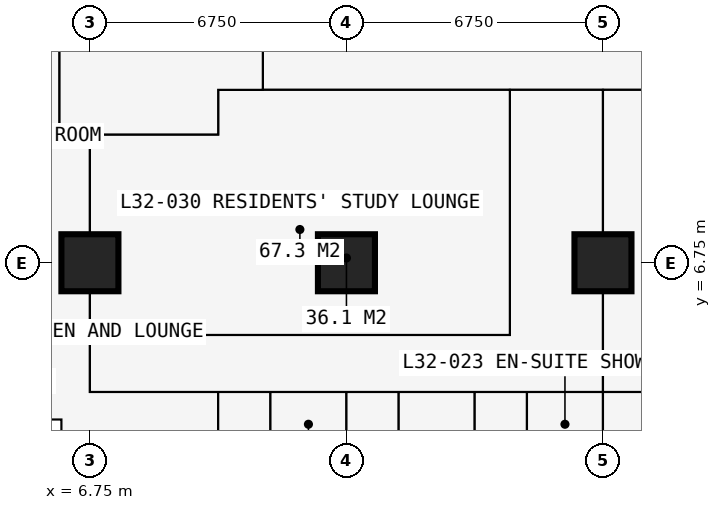
"""IFC4 building model, lengths in metres.
Left out: names, types, materials, properties, quantities, classifications, styles, units other than length and angle.
Written with IfcOpenShell. Run it as: python <this file> out.ifc"""

import sys

from ifc_helpers import new_model, si_unit, direction, frame, frame_2d, origin, origin_2d, place, context, subcontext, project, spatial, rectangle, extrude, element, fill, save


model = new_model("IFC4")
c1 = context("Model", 3, precision=1e-05, world=origin(), true_north=direction((0.0, 1.0)))
c2 = subcontext(c1, "Body", "Model", "MODEL_VIEW")
j1 = project(units=[si_unit("LENGTHUNIT", "METRE"), si_unit("PLANEANGLEUNIT", "RADIAN")], contexts=[c1])
p1 = place(None, origin())
s1 = spatial("IfcSite", under=j1, at=p1, CompositionType="ELEMENT")
p2 = place(p1, origin())
s2 = spatial("IfcBuilding", under=s1, at=p2, CompositionType="ELEMENT")
p3 = place(p2, frame((0.0, 0.0, 119.7)))
s3 = spatial("IfcBuildingStorey", under=s2, at=p3, CompositionType="ELEMENT", Elevation=119.7)
for number, where, z_axis, x_axis in (
    (1, (6.75, 6.75, 0.0), (0.0, 0.0, 1.0), (1.0, 0.0, 0.0)),
    (2, (13.5, 6.75, 0.0), (0.0, 0.0, 1.0), (1.0, 0.0, 0.0)),
    (3, (20.25, 6.75, 0.0), (0.0, 0.0, 1.0), (1.0, 0.0, 0.0)),
):
    element("IfcColumn", number, at=place(p3, frame(where, z_axis=z_axis, x_axis=x_axis)), inside=s3, PredefinedType="COLUMN", context=c2, shape_type="SweptSolid", body=[
        extrude(rectangle(XDim=1.5, YDim=1.5, at=origin_2d()), origin(), (0.0, 0.0, 1.0), 3.6),
    ])
p4 = place(p3, frame((2.625, 2.625, 0.0), z_axis=(0.0, 0.0, 1.0), x_axis=(1.0, 0.0, 0.0)))
e4 = element("IfcWall", 4, at=p4, inside=s3, PredefinedType="SOLIDWALL", context=c2, shape_type="SweptSolid", body=[
    extrude(rectangle(XDim=3.375, YDim=0.3, at=frame_2d((1.688, 0.0))), origin(), (0.0, 0.0, 1.0), 3.375),
])
p5 = place(p4, frame((0.788, 0.0, 0.6)))
e5 = element("IfcOpeningElement", 5, at=p5, cuts=e4, PredefinedType="OPENING", context=c2, shape_type="SweptSolid", body=[
    extrude(rectangle(XDim=1.8, YDim=2.1, at=frame_2d((0.9, 1.05))), frame((0.0, 0.16, 0.0), z_axis=(0.0, -1.0, 0.0), x_axis=(1.0, 0.0, 0.0)), (0.0, 0.0, 1.0), 0.32),
])
p6 = place(p3, frame((6.0, 2.625, 0.0), z_axis=(0.0, 0.0, 1.0), x_axis=(0.0, -1.0, 0.0)))
e6 = element("IfcWall", 6, at=p6, inside=s3, PredefinedType="SOLIDWALL", context=c2, shape_type="SweptSolid", body=[
    extrude(rectangle(XDim=3.375, YDim=0.3, at=frame_2d((1.688, 0.0))), origin(), (0.0, 0.0, 1.0), 3.375),
])
p7 = place(p6, frame((0.268, 0.0, 0.9)))
e7 = element("IfcOpeningElement", 7, at=p7, cuts=e6, PredefinedType="OPENING", context=c2, shape_type="SweptSolid", body=[
    extrude(rectangle(XDim=1.5, YDim=1.8, at=frame_2d((0.75, 0.9))), frame((0.0, 0.16, 0.0), z_axis=(0.0, -1.0, 0.0), x_axis=(1.0, 0.0, 0.0)), (0.0, 0.0, 1.0), 0.32),
])
p8 = place(p3, frame((-0.734, 10.125, 0.0), z_axis=(0.0, 0.0, 1.0), x_axis=(1.0, 0.0, 0.0)))
e8 = element("IfcWall", 8, at=p8, inside=s3, PredefinedType="PARTITIONING", context=c2, shape_type="SweptSolid", body=[
    extrude(rectangle(XDim=10.859, YDim=0.15, at=frame_2d((5.429, 0.0))), origin(), (0.0, 0.0, 1.0), 3.375),
])
p9 = place(p3, frame((5.95, 10.125, 0.0), z_axis=(0.0, 0.0, 1.0), x_axis=(0.0, 1.0, 0.0)))
e9 = element("IfcWall", 9, at=p9, inside=s3, PredefinedType="PARTITIONING", context=c2, shape_type="SweptSolid", body=[
    extrude(rectangle(XDim=2.65, YDim=0.15, at=frame_2d((1.325, 0.0))), origin(), (0.0, 0.0, 1.0), 3.375),
])
p10 = place(p3, frame((6.75, 3.35, 0.0), z_axis=(0.0, 0.0, 1.0), x_axis=(0.0, 1.0, 0.0)))
e10 = element("IfcWall", 10, at=p10, inside=s3, PredefinedType="PARTITIONING", context=c2, shape_type="SweptSolid", body=[
    extrude(rectangle(XDim=6.775, YDim=0.15, at=frame_2d((3.387, 0.0))), origin(), (0.0, 0.0, 1.0), 2.877),
])
p11 = place(p3, frame((6.75, 3.35, 0.0), z_axis=(0.0, 0.0, 1.0), x_axis=(1.0, 0.0, 0.0)))
e11 = element("IfcWall", 11, at=p11, inside=s3, PredefinedType="PARTITIONING", context=c2, shape_type="SweptSolid", body=[
    extrude(rectangle(XDim=23.625, YDim=0.1, at=frame_2d((11.812, 0.0))), origin(), (0.0, 0.0, 1.0), 3.375),
])
p12 = place(p11, frame((1.2, 0.0, 0.0)))
e12 = element("IfcOpeningElement", 12, at=p12, cuts=e11, PredefinedType="OPENING", context=c2, shape_type="SweptSolid", body=[
    extrude(rectangle(XDim=1.0, YDim=2.2, at=frame_2d((0.5, 1.1))), frame((0.0, 0.06, 0.0), z_axis=(0.0, -1.0, 0.0), x_axis=(1.0, 0.0, 0.0)), (0.0, 0.0, 1.0), 0.12),
])
p13 = place(p11, frame((3.575, 0.0, 0.0)))
e13 = element("IfcOpeningElement", 13, at=p13, cuts=e11, PredefinedType="OPENING", context=c2, shape_type="SweptSolid", body=[
    extrude(rectangle(XDim=0.95, YDim=2.2, at=frame_2d((0.475, 1.1))), frame((0.0, 0.06, 0.0), z_axis=(0.0, -1.0, 0.0), x_axis=(1.0, 0.0, 0.0)), (0.0, 0.0, 1.0), 0.12),
])
p14 = place(p11, frame((6.95, 0.0, 0.0)))
e14 = element("IfcOpeningElement", 14, at=p14, cuts=e11, PredefinedType="OPENING", context=c2, shape_type="SweptSolid", body=[
    extrude(rectangle(XDim=0.95, YDim=2.2, at=frame_2d((0.475, 1.1))), frame((0.0, 0.06, 0.0), z_axis=(0.0, -1.0, 0.0), x_axis=(1.0, 0.0, 0.0)), (0.0, 0.0, 1.0), 0.12),
])
p15 = place(p11, frame((10.325, 0.0, 0.0)))
e15 = element("IfcOpeningElement", 15, at=p15, cuts=e11, PredefinedType="OPENING", context=c2, shape_type="SweptSolid", body=[
    extrude(rectangle(XDim=0.95, YDim=2.2, at=frame_2d((0.475, 1.1))), frame((0.0, 0.06, 0.0), z_axis=(0.0, -1.0, 0.0), x_axis=(1.0, 0.0, 0.0)), (0.0, 0.0, 1.0), 0.12),
])
p16 = place(p11, frame((18.475, 0.0, 0.0)))
e16 = element("IfcOpeningElement", 16, at=p16, cuts=e11, PredefinedType="OPENING", context=c2, shape_type="SweptSolid", body=[
    extrude(rectangle(XDim=0.95, YDim=2.2, at=frame_2d((0.475, 1.1))), frame((0.0, 0.06, 0.0), z_axis=(0.0, -1.0, 0.0), x_axis=(1.0, 0.0, 0.0)), (0.0, 0.0, 1.0), 0.12),
])
p17 = place(p11, frame((13.7, 0.0, 0.0)))
e17 = element("IfcOpeningElement", 17, at=p17, cuts=e11, PredefinedType="OPENING", context=c2, shape_type="SweptSolid", body=[
    extrude(rectangle(XDim=0.95, YDim=2.2, at=frame_2d((0.475, 1.1))), frame((0.0, 0.06, 0.0), z_axis=(0.0, -1.0, 0.0), x_axis=(1.0, 0.0, 0.0)), (0.0, 0.0, 1.0), 0.12),
])
p18 = place(p3, frame((6.75, 4.85, 0.0), z_axis=(0.0, 0.0, 1.0), x_axis=(1.0, 0.0, 0.0)))
e18 = element("IfcWall", 18, at=p18, inside=s3, PredefinedType="PARTITIONING", context=c2, shape_type="SweptSolid", body=[
    extrude(rectangle(XDim=11.05, YDim=0.15, at=frame_2d((5.525, 0.0))), origin(), (0.0, 0.0, 1.0), 3.375),
])
p19 = place(p3, frame((10.125, -0.734, 0.0), z_axis=(0.0, 0.0, 1.0), x_axis=(0.0, 1.0, 0.0)))
e19 = element("IfcWall", 19, at=p19, inside=s3, PredefinedType="PARTITIONING", context=c2, shape_type="SweptSolid", body=[
    extrude(rectangle(XDim=4.084, YDim=0.15, at=frame_2d((2.042, 0.0))), origin(), (0.0, 0.0, 1.0), 3.375),
])
p20 = place(p3, frame((10.125, 10.125, 0.0), z_axis=(0.0, 0.0, 1.0), x_axis=(0.0, 1.0, 0.0)))
e20 = element("IfcWall", 20, at=p20, inside=s3, PredefinedType="PARTITIONING", context=c2, shape_type="SweptSolid", body=[
    extrude(rectangle(XDim=1.175, YDim=0.15, at=frame_2d((0.587, 0.0))), origin(), (0.0, 0.0, 1.0), 3.375),
])
p21 = place(p3, frame((10.125, 11.3, 0.0), z_axis=(0.0, 0.0, 1.0), x_axis=(1.0, 0.0, 0.0)))
e21 = element("IfcWall", 21, at=p21, inside=s3, PredefinedType="PARTITIONING", context=c2, shape_type="SweptSolid", body=[
    extrude(rectangle(XDim=20.675, YDim=0.15, at=frame_2d((10.337, 0.0))), origin(), (0.0, 0.0, 1.0), 3.375),
])
p22 = place(p21, frame((8.375, 0.0, 0.0)))
e22 = element("IfcOpeningElement", 22, at=p22, cuts=e21, PredefinedType="OPENING", context=c2, shape_type="SweptSolid", body=[
    extrude(rectangle(XDim=1.0, YDim=2.2, at=frame_2d((0.5, 1.1))), frame((0.0, 0.085, 0.0), z_axis=(0.0, -1.0, 0.0), x_axis=(1.0, 0.0, 0.0)), (0.0, 0.0, 1.0), 0.17),
])
p23 = place(p21, frame((10.975, 0.0, 0.0)))
e23 = element("IfcOpeningElement", 23, at=p23, cuts=e21, PredefinedType="OPENING", context=c2, shape_type="SweptSolid", body=[
    extrude(rectangle(XDim=1.0, YDim=2.2, at=frame_2d((0.5, 1.1))), frame((0.0, 0.085, 0.0), z_axis=(0.0, -1.0, 0.0), x_axis=(1.0, 0.0, 0.0)), (0.0, 0.0, 1.0), 0.17),
])
p24 = place(p21, frame((3.925, 0.0, 0.0)))
e24 = element("IfcOpeningElement", 24, at=p24, cuts=e21, PredefinedType="OPENING", context=c2, shape_type="SweptSolid", body=[
    extrude(rectangle(XDim=0.95, YDim=2.2, at=frame_2d((0.475, 1.1))), frame((0.0, 0.085, 0.0), z_axis=(0.0, -1.0, 0.0), x_axis=(1.0, 0.0, 0.0)), (0.0, 0.0, 1.0), 0.17),
])
p25 = place(p3, frame((11.3, 11.3, 0.0), z_axis=(0.0, 0.0, 1.0), x_axis=(0.0, 1.0, 0.0)))
e25 = element("IfcWall", 25, at=p25, inside=s3, PredefinedType="PARTITIONING", context=c2, shape_type="SweptSolid", body=[
    extrude(rectangle(XDim=19.3, YDim=0.15, at=frame_2d((9.65, 0.0))), origin(), (0.0, 0.0, 1.0), 3.375),
])
p26 = place(p25, frame((18.1, 0.0, 0.0)))
e26 = element("IfcOpeningElement", 26, at=p26, cuts=e25, PredefinedType="OPENING", context=c2, shape_type="SweptSolid", body=[
    extrude(rectangle(XDim=1.0, YDim=2.2, at=frame_2d((0.5, 1.1))), frame((0.0, 0.085, 0.0), z_axis=(0.0, -1.0, 0.0), x_axis=(1.0, 0.0, 0.0)), (0.0, 0.0, 1.0), 0.17),
])
p27 = place(p25, frame((10.137, 0.0, 0.0)))
e27 = element("IfcOpeningElement", 27, at=p27, cuts=e25, PredefinedType="OPENING", context=c2, shape_type="SweptSolid", body=[
    extrude(rectangle(XDim=1.0, YDim=2.2, at=frame_2d((0.5, 1.1))), frame((0.0, 0.085, 0.0), z_axis=(0.0, -1.0, 0.0), x_axis=(1.0, 0.0, 0.0)), (0.0, 0.0, 1.0), 0.17),
])
p28 = place(p3, frame((11.5, 1.15, 0.0), z_axis=(0.0, 0.0, 1.0), x_axis=(0.0, 1.0, 0.0)))
e28 = element("IfcWall", 28, at=p28, inside=s3, PredefinedType="PARTITIONING", context=c2, shape_type="SweptSolid", body=[
    extrude(rectangle(XDim=2.2, YDim=0.1, at=frame_2d((1.1, 0.0))), origin(), (0.0, 0.0, 1.0), 3.375),
])
p29 = place(p28, frame((0.65, 0.0, 0.0)))
e29 = element("IfcOpeningElement", 29, at=p29, cuts=e28, PredefinedType="OPENING", context=c2, shape_type="SweptSolid", body=[
    extrude(rectangle(XDim=0.9, YDim=2.2, at=frame_2d((0.45, 1.1))), frame((0.0, 0.06, 0.0), z_axis=(0.0, -1.0, 0.0), x_axis=(1.0, 0.0, 0.0)), (0.0, 0.0, 1.0), 0.12),
])
p30 = place(p3, frame((13.5, -0.734, 0.0), z_axis=(0.0, 0.0, 1.0), x_axis=(0.0, 1.0, 0.0)))
e30 = element("IfcWall", 30, at=p30, inside=s3, PredefinedType="PARTITIONING", context=c2, shape_type="SweptSolid", body=[
    extrude(rectangle(XDim=4.084, YDim=0.1, at=frame_2d((2.042, 0.0))), origin(), (0.0, 0.0, 1.0), 2.61),
])
p31 = place(p3, frame((14.875, 1.15, 0.0), z_axis=(0.0, 0.0, 1.0), x_axis=(0.0, 1.0, 0.0)))
e31 = element("IfcWall", 31, at=p31, inside=s3, PredefinedType="PARTITIONING", context=c2, shape_type="SweptSolid", body=[
    extrude(rectangle(XDim=2.2, YDim=0.1, at=frame_2d((1.1, 0.0))), origin(), (0.0, 0.0, 1.0), 3.375),
])
p32 = place(p31, frame((0.65, 0.0, 0.0)))
e32 = element("IfcOpeningElement", 32, at=p32, cuts=e31, PredefinedType="OPENING", context=c2, shape_type="SweptSolid", body=[
    extrude(rectangle(XDim=0.9, YDim=2.2, at=frame_2d((0.45, 1.1))), frame((0.0, 0.06, 0.0), z_axis=(0.0, -1.0, 0.0), x_axis=(1.0, 0.0, 0.0)), (0.0, 0.0, 1.0), 0.12),
])
p33 = place(p3, frame((16.875, -0.734, 0.0), z_axis=(0.0, 0.0, 1.0), x_axis=(0.0, 1.0, 0.0)))
e33 = element("IfcWall", 33, at=p33, inside=s3, PredefinedType="PARTITIONING", context=c2, shape_type="SweptSolid", body=[
    extrude(rectangle(XDim=4.084, YDim=0.1, at=frame_2d((2.042, 0.0))), origin(), (0.0, 0.0, 1.0), 3.375),
])
p34 = place(p3, frame((17.8, 4.85, 0.0), z_axis=(0.0, 0.0, 1.0), x_axis=(0.0, 1.0, 0.0)))
e34 = element("IfcWall", 34, at=p34, inside=s3, PredefinedType="PARTITIONING", context=c2, shape_type="SweptSolid", body=[
    extrude(rectangle(XDim=6.45, YDim=0.15, at=frame_2d((3.225, 0.0))), origin(), (0.0, 0.0, 1.0), 3.375),
])
p35 = place(p3, frame((18.25, 1.15, 0.0), z_axis=(0.0, 0.0, 1.0), x_axis=(0.0, 1.0, 0.0)))
e35 = element("IfcWall", 35, at=p35, inside=s3, PredefinedType="PARTITIONING", context=c2, shape_type="SweptSolid", body=[
    extrude(rectangle(XDim=2.2, YDim=0.1, at=frame_2d((1.1, 0.0))), origin(), (0.0, 0.0, 1.0), 3.375),
])
p36 = place(p35, frame((0.65, 0.0, 0.0)))
e36 = element("IfcOpeningElement", 36, at=p36, cuts=e35, PredefinedType="OPENING", context=c2, shape_type="SweptSolid", body=[
    extrude(rectangle(XDim=0.9, YDim=2.2, at=frame_2d((0.45, 1.1))), frame((0.0, 0.06, 0.0), z_axis=(0.0, -1.0, 0.0), x_axis=(1.0, 0.0, 0.0)), (0.0, 0.0, 1.0), 0.12),
])
p37 = place(p3, frame((20.25, -0.734, 0.0), z_axis=(0.0, 0.0, 1.0), x_axis=(0.0, 1.0, 0.0)))
e37 = element("IfcWall", 37, at=p37, inside=s3, PredefinedType="PARTITIONING", context=c2, shape_type="SweptSolid", body=[
    extrude(rectangle(XDim=12.034, YDim=0.15, at=frame_2d((6.017, 0.0))), origin(), (0.0, 0.0, 1.0), 2.61),
])
p38 = place(p7, origin())
e38 = element("IfcWindow", 38, at=p38, inside=s3, PartitioningType="SINGLE_PANEL", PredefinedType="WINDOW", context=c2, shape_type="SweptSolid", body=[
    extrude(rectangle(XDim=1.5, YDim=1.8, at=frame_2d((0.75, 0.9))), frame((0.0, 0.03, 0.0), z_axis=(0.0, -1.0, 0.0), x_axis=(1.0, 0.0, 0.0)), (0.0, 0.0, 1.0), 0.06),
])
fill(e7, e38)
p39 = place(p12, origin())
e39 = element("IfcDoor", 39, at=p39, inside=s3, OperationType="SINGLE_SWING_LEFT", PredefinedType="DOOR", context=c2, shape_type="SweptSolid", body=[
    extrude(rectangle(XDim=1.0, YDim=2.2, at=frame_2d((0.5, 1.1))), frame((0.0, 0.025, 0.0), z_axis=(0.0, -1.0, 0.0), x_axis=(1.0, 0.0, 0.0)), (0.0, 0.0, 1.0), 0.05),
])
fill(e12, e39)
p40 = place(p13, origin())
e40 = element("IfcDoor", 40, at=p40, inside=s3, OperationType="SINGLE_SWING_LEFT", PredefinedType="DOOR", context=c2, shape_type="SweptSolid", body=[
    extrude(rectangle(XDim=0.95, YDim=2.2, at=frame_2d((0.475, 1.1))), frame((0.0, 0.025, 0.0), z_axis=(0.0, -1.0, 0.0), x_axis=(1.0, 0.0, 0.0)), (0.0, 0.0, 1.0), 0.05),
])
fill(e13, e40)
p41 = place(p29, origin())
e41 = element("IfcDoor", 41, at=p41, inside=s3, OperationType="SINGLE_SWING_RIGHT", PredefinedType="DOOR", context=c2, shape_type="SweptSolid", body=[
    extrude(rectangle(XDim=0.9, YDim=2.2, at=frame_2d((0.45, 1.1))), frame((0.0, 0.025, 0.0), z_axis=(0.0, -1.0, 0.0), x_axis=(1.0, 0.0, 0.0)), (0.0, 0.0, 1.0), 0.05),
])
fill(e29, e41)
p42 = place(p14, origin())
e42 = element("IfcDoor", 42, at=p42, inside=s3, OperationType="SINGLE_SWING_LEFT", PredefinedType="DOOR", context=c2, shape_type="SweptSolid", body=[
    extrude(rectangle(XDim=0.95, YDim=2.2, at=frame_2d((0.475, 1.1))), frame((0.0, 0.025, 0.0), z_axis=(0.0, -1.0, 0.0), x_axis=(1.0, 0.0, 0.0)), (0.0, 0.0, 1.0), 0.05),
])
fill(e14, e42)
p43 = place(p32, origin())
e43 = element("IfcDoor", 43, at=p43, inside=s3, OperationType="SINGLE_SWING_RIGHT", PredefinedType="DOOR", context=c2, shape_type="SweptSolid", body=[
    extrude(rectangle(XDim=0.9, YDim=2.2, at=frame_2d((0.45, 1.1))), frame((0.0, 0.025, 0.0), z_axis=(0.0, -1.0, 0.0), x_axis=(1.0, 0.0, 0.0)), (0.0, 0.0, 1.0), 0.05),
])
fill(e32, e43)
p44 = place(p15, origin())
e44 = element("IfcDoor", 44, at=p44, inside=s3, OperationType="SINGLE_SWING_LEFT", PredefinedType="DOOR", context=c2, shape_type="SweptSolid", body=[
    extrude(rectangle(XDim=0.95, YDim=2.2, at=frame_2d((0.475, 1.1))), frame((0.0, 0.025, 0.0), z_axis=(0.0, -1.0, 0.0), x_axis=(1.0, 0.0, 0.0)), (0.0, 0.0, 1.0), 0.05),
])
fill(e15, e44)
p45 = place(p36, origin())
e45 = element("IfcDoor", 45, at=p45, inside=s3, OperationType="SINGLE_SWING_RIGHT", PredefinedType="DOOR", context=c2, shape_type="SweptSolid", body=[
    extrude(rectangle(XDim=0.9, YDim=2.2, at=frame_2d((0.45, 1.1))), frame((0.0, 0.025, 0.0), z_axis=(0.0, -1.0, 0.0), x_axis=(1.0, 0.0, 0.0)), (0.0, 0.0, 1.0), 0.05),
])
fill(e36, e45)
p46 = place(p22, origin())
e46 = element("IfcDoor", 46, at=p46, inside=s3, OperationType="SINGLE_SWING_LEFT", PredefinedType="DOOR", context=c2, shape_type="SweptSolid", body=[
    extrude(rectangle(XDim=1.0, YDim=2.2, at=frame_2d((0.5, 1.1))), frame((0.0, 0.025, 0.0), z_axis=(0.0, -1.0, 0.0), x_axis=(1.0, 0.0, 0.0)), (0.0, 0.0, 1.0), 0.05),
])
fill(e22, e46)
p47 = place(p17, origin())
e47 = element("IfcDoor", 47, at=p47, inside=s3, OperationType="SINGLE_SWING_LEFT", PredefinedType="DOOR", context=c2, shape_type="SweptSolid", body=[
    extrude(rectangle(XDim=0.95, YDim=2.2, at=frame_2d((0.475, 1.1))), frame((0.0, 0.025, 0.0), z_axis=(0.0, -1.0, 0.0), x_axis=(1.0, 0.0, 0.0)), (0.0, 0.0, 1.0), 0.05),
])
fill(e17, e47)
p48 = place(p23, origin())
e48 = element("IfcDoor", 48, at=p48, inside=s3, OperationType="SINGLE_SWING_LEFT", PredefinedType="DOOR", context=c2, shape_type="SweptSolid", body=[
    extrude(rectangle(XDim=1.0, YDim=2.2, at=frame_2d((0.5, 1.1))), frame((0.0, 0.025, 0.0), z_axis=(0.0, -1.0, 0.0), x_axis=(1.0, 0.0, 0.0)), (0.0, 0.0, 1.0), 0.05),
])
fill(e23, e48)
p49 = place(p24, origin())
e49 = element("IfcDoor", 49, at=p49, inside=s3, OperationType="SINGLE_SWING_LEFT", PredefinedType="DOOR", context=c2, shape_type="SweptSolid", body=[
    extrude(rectangle(XDim=0.95, YDim=2.2, at=frame_2d((0.475, 1.1))), frame((0.0, 0.025, 0.0), z_axis=(0.0, -1.0, 0.0), x_axis=(1.0, 0.0, 0.0)), (0.0, 0.0, 1.0), 0.05),
])
fill(e24, e49)
save(model, sys.argv[1])
